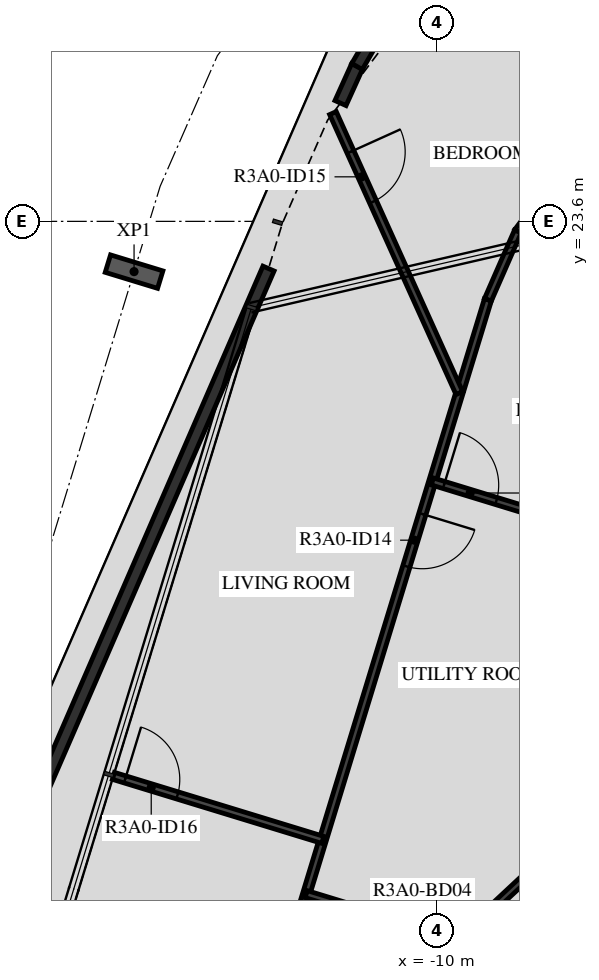
"""IFC4 building model, lengths in metres.
Left out: names, types, materials, properties, quantities, classifications, styles, units other than length and angle.
Written with IfcOpenShell. Run it as: python <this file> out.ifc"""

import sys

from ifc_helpers import new_model, si_unit, direction, frame, frame_2d, origin, origin_2d, place, context, subcontext, project, spatial, rectangle, i_section, extrude, element, fill, save


model = new_model("IFC4")
c1 = context("Model", 3, precision=1e-05, world=origin(), true_north=direction((0.0, 1.0)))
c2 = subcontext(c1, "Body", "Model", "MODEL_VIEW")
j1 = project(units=[si_unit("LENGTHUNIT", "METRE"), si_unit("PLANEANGLEUNIT", "RADIAN")], contexts=[c1])
p1 = place(None, origin())
s1 = spatial("IfcSite", under=j1, at=p1, CompositionType="ELEMENT")
p2 = place(p1, origin())
s2 = spatial("IfcBuilding", under=s1, at=p2, CompositionType="ELEMENT")
p3 = place(p2, frame((0.0, 0.0, 113.4)))
s3 = spatial("IfcBuildingStorey", under=s2, at=p3, CompositionType="ELEMENT", Elevation=113.4)
p4 = place(p3, frame((-14.987, 22.773, -0.45), z_axis=(0.0, 0.0, 1.0), x_axis=(0.29237190653, 0.956304694264, 0.0)))
e1 = element("IfcColumn", 1, at=p4, inside=s3, PredefinedType="COLUMN", context=c2, shape_type="SweptSolid", body=[
    extrude(i_section(OverallWidth=0.3, OverallDepth=0.9, WebThickness=0.019, FlangeThickness=0.035, FilletRadius=0.03, at=origin_2d()), origin(), (0.0, 0.0, 1.0), 3.57),
])
p5 = place(p3, frame((-26.845, -9.558, 0.03), z_axis=(0.0, 0.0, 1.0), x_axis=(0.398491196924, 0.917172157217, 0.0)))
e2 = element("IfcWall", 2, at=p5, inside=s3, PredefinedType="PARAPET", context=c2, shape_type="SweptSolid", body=[
    extrude(rectangle(XDim=35.306, YDim=0.2, at=frame_2d((17.653, 0.0))), origin(), (0.0, 0.0, 1.0), 1.5),
])
p6 = place(p3, frame((-11.593, 25.545, 0.03), z_axis=(0.0, 0.0, 1.0), x_axis=(0.412088088401, 0.911144010241, 0.0)))
e3 = element("IfcWall", 3, at=p6, inside=s3, PredefinedType="PARAPET", context=c2, shape_type="SweptSolid", body=[
    extrude(rectangle(XDim=0.665, YDim=0.2, at=frame_2d((0.333, 0.0))), origin(), (0.0, 0.0, 1.0), 1.5),
])
p7 = place(p3, frame((-11.321, 26.147, 0.03), z_axis=(0.0, 0.0, 1.0), x_axis=(0.502532095663, 0.864558553731, 0.0)))
e4 = element("IfcWall", 4, at=p7, inside=s3, PredefinedType="PARAPET", context=c2, shape_type="SweptSolid", body=[
    extrude(rectangle(XDim=2.257, YDim=0.2, at=frame_2d((1.128, 0.0))), origin(), (0.0, 0.0, 1.0), 1.5),
])
p8 = place(p3, frame((-6.659, 12.523, 0.0), z_axis=(0.0, 0.0, 1.0), x_axis=(-0.731350455479, -0.682001841105, 0.0)))
e5 = element("IfcWall", 5, at=p8, inside=s3, PredefinedType="STANDARD", context=c2, shape_type="SweptSolid", body=[
    extrude(rectangle(XDim=7.342, YDim=0.2, at=frame_2d((3.671, 0.0))), origin(), (0.0, 0.0, 1.0), 3.12),
])
p9 = place(p8, frame((4.2, 0.0, 0.0)))
e6 = element("IfcOpeningElement", 6, at=p9, cuts=e5, PredefinedType="OPENING", context=c2, shape_type="SweptSolid", body=[
    extrude(rectangle(XDim=1.0, YDim=2.1, at=frame_2d((0.5, 1.05))), frame((0.0, 0.11, 0.0), z_axis=(0.0, -1.0, 0.0), x_axis=(1.0, 0.0, 0.0)), (0.0, 0.0, 1.0), 0.22),
])
p10 = place(p3, frame((-7.388, 13.894, 0.0), z_axis=(0.0, 0.0, 1.0), x_axis=(-0.731357186721, -0.681994622729, 0.0)))
e7 = element("IfcWall", 7, at=p10, inside=s3, PredefinedType="PARTITIONING", context=c2, shape_type="SweptSolid", body=[
    extrude(rectangle(XDim=8.146, YDim=0.12, at=frame_2d((4.073, 0.0))), origin(), (0.0, 0.0, 1.0), 3.12),
])
p11 = place(p10, frame((3.509, 0.0, 0.0)))
e8 = element("IfcOpeningElement", 8, at=p11, cuts=e7, PredefinedType="OPENING", context=c2, shape_type="SweptSolid", body=[
    extrude(rectangle(XDim=0.8, YDim=2.1, at=frame_2d((0.4, 1.05))), frame((0.0, 0.07, 0.0), z_axis=(0.0, -1.0, 0.0), x_axis=(1.0, 0.0, 0.0)), (0.0, 0.0, 1.0), 0.14),
])
p12 = place(p3, frame((-8.065, 24.245, 0.0), z_axis=(0.0, 0.0, 1.0), x_axis=(-0.601959070304, -0.798526942363, 0.0)))
e9 = element("IfcWall", 9, at=p12, inside=s3, PredefinedType="PARTITIONING", context=c2, shape_type="SweptSolid", body=[
    extrude(rectangle(XDim=1.016, YDim=0.12, at=frame_2d((0.508, 0.0))), origin(), (0.0, 0.0, 1.0), 3.12),
])
p13 = place(p3, frame((-8.677, 23.433, 0.0), z_axis=(0.0, 0.0, 1.0), x_axis=(-0.401351130635, -0.915924270853, 0.0)))
e10 = element("IfcWall", 10, at=p13, inside=s3, PredefinedType="PARTITIONING", context=c2, shape_type="SweptSolid", body=[
    extrude(rectangle(XDim=1.227, YDim=0.12, at=frame_2d((0.614, 0.0))), origin(), (0.0, 0.0, 1.0), 3.12),
])
p14 = place(p3, frame((-9.169, 22.31, 0.0), z_axis=(0.0, 0.0, 1.0), x_axis=(-0.29236145486, -0.956307889601, 0.0)))
e11 = element("IfcWall", 11, at=p14, inside=s3, PredefinedType="PARTITIONING", context=c2, shape_type="SweptSolid", body=[
    extrude(rectangle(XDim=17.316, YDim=0.12, at=frame_2d((8.658, 0.0))), origin(), (0.0, 0.0, 1.0), 3.12),
])
p15 = place(p14, frame((3.683, 0.0, 0.0)))
e12 = element("IfcOpeningElement", 12, at=p15, cuts=e11, PredefinedType="OPENING", context=c2, shape_type="SweptSolid", body=[
    extrude(rectangle(XDim=0.9, YDim=2.1, at=frame_2d((0.45, 1.05))), frame((0.0, 0.07, 0.0), z_axis=(0.0, -1.0, 0.0), x_axis=(1.0, 0.0, 0.0)), (0.0, 0.0, 1.0), 0.14),
])
p16 = place(p3, frame((-10.082, 19.323, 0.0), z_axis=(0.0, 0.0, 1.0), x_axis=(0.956300011431, -0.292387222936, 0.0)))
e13 = element("IfcWall", 13, at=p16, inside=s3, PredefinedType="PARTITIONING", context=c2, shape_type="SweptSolid", body=[
    extrude(rectangle(XDim=6.324, YDim=0.12, at=frame_2d((3.162, 0.0))), origin(), (0.0, 0.0, 1.0), 3.12),
])
p17 = place(p16, frame((0.2, 0.0, 0.0)))
e14 = element("IfcOpeningElement", 14, at=p17, cuts=e13, PredefinedType="OPENING", context=c2, shape_type="SweptSolid", body=[
    extrude(rectangle(XDim=0.9, YDim=2.1, at=frame_2d((0.45, 1.05))), frame((0.0, 0.07, 0.0), z_axis=(0.0, -1.0, 0.0), x_axis=(1.0, 0.0, 0.0)), (0.0, 0.0, 1.0), 0.14),
])
p18 = place(p3, frame((-11.717, 25.381, 0.0), z_axis=(0.0, 0.0, 1.0), x_axis=(0.411493504767, -0.911412692217, 0.0)))
e15 = element("IfcWall", 15, at=p18, inside=s3, PredefinedType="PARTITIONING", context=c2, shape_type="SweptSolid", body=[
    extrude(rectangle(XDim=5.052, YDim=0.12, at=frame_2d((2.526, 0.0))), origin(), (0.0, 0.0, 1.0), 3.12),
])
p19 = place(p18, frame((0.7, 0.0, 0.0)))
e16 = element("IfcOpeningElement", 16, at=p19, cuts=e15, PredefinedType="OPENING", context=c2, shape_type="SweptSolid", body=[
    extrude(rectangle(XDim=0.9, YDim=2.1, at=frame_2d((0.45, 1.05))), frame((0.0, 0.07, 0.0), z_axis=(0.0, -1.0, 0.0), x_axis=(1.0, 0.0, 0.0)), (0.0, 0.0, 1.0), 0.14),
])
p20 = place(p3, frame((-12.157, 12.537, 0.0), z_axis=(0.0, 0.0, 1.0), x_axis=(0.956293441844, -0.292408708979, 0.0)))
e17 = element("IfcWall", 17, at=p20, inside=s3, PredefinedType="PARTITIONING", context=c2, shape_type="SweptSolid", body=[
    extrude(rectangle(XDim=2.609, YDim=0.12, at=frame_2d((1.305, 0.0))), origin(), (0.0, 0.0, 1.0), 3.12),
])
p21 = place(p3, frame((-15.327, 14.481, 0.0), z_axis=(0.0, 0.0, 1.0), x_axis=(0.956306810244, -0.292364985388, 0.0)))
e18 = element("IfcWall", 18, at=p21, inside=s3, PredefinedType="PARTITIONING", context=c2, shape_type="SweptSolid", body=[
    extrude(rectangle(XDim=3.6, YDim=0.12, at=frame_2d((1.8, 0.0))), origin(), (0.0, 0.0, 1.0), 2.73),
])
p22 = place(p21, frame((0.2, 0.0, 0.0)))
e19 = element("IfcOpeningElement", 19, at=p22, cuts=e18, PredefinedType="OPENING", context=c2, shape_type="SweptSolid", body=[
    extrude(rectangle(XDim=0.9, YDim=2.1, at=frame_2d((0.45, 1.05))), frame((0.0, 0.07, 0.0), z_axis=(0.0, -1.0, 0.0), x_axis=(1.0, 0.0, 0.0)), (0.0, 0.0, 1.0), 0.14),
])
p23 = place(p17, origin())
e20 = element("IfcDoor", 20, at=p23, inside=s3, OperationType="SINGLE_SWING_LEFT", PredefinedType="DOOR", context=c2, shape_type="SweptSolid", body=[
    extrude(rectangle(XDim=0.9, YDim=2.1, at=frame_2d((0.45, 1.05))), frame((0.0, 0.025, 0.0), z_axis=(0.0, -1.0, 0.0), x_axis=(1.0, 0.0, 0.0)), (0.0, 0.0, 1.0), 0.05),
])
fill(e14, e20)
p24 = place(p15, origin())
e21 = element("IfcDoor", 21, at=p24, inside=s3, OperationType="SINGLE_SWING_LEFT", PredefinedType="DOOR", context=c2, shape_type="SweptSolid", body=[
    extrude(rectangle(XDim=0.9, YDim=2.1, at=frame_2d((0.45, 1.05))), frame((0.0, 0.025, 0.0), z_axis=(0.0, -1.0, 0.0), x_axis=(1.0, 0.0, 0.0)), (0.0, 0.0, 1.0), 0.05),
])
fill(e12, e21)
p25 = place(p19, origin())
e22 = element("IfcDoor", 22, at=p25, inside=s3, OperationType="SINGLE_SWING_LEFT", PredefinedType="DOOR", context=c2, shape_type="SweptSolid", body=[
    extrude(rectangle(XDim=0.9, YDim=2.1, at=frame_2d((0.45, 1.05))), frame((0.0, 0.025, 0.0), z_axis=(0.0, -1.0, 0.0), x_axis=(1.0, 0.0, 0.0)), (0.0, 0.0, 1.0), 0.05),
])
fill(e16, e22)
p26 = place(p22, origin())
e23 = element("IfcDoor", 23, at=p26, inside=s3, OperationType="SINGLE_SWING_RIGHT", PredefinedType="DOOR", context=c2, shape_type="SweptSolid", body=[
    extrude(rectangle(XDim=0.9, YDim=2.1, at=frame_2d((0.45, 1.05))), frame((0.0, 0.025, 0.0), z_axis=(0.0, -1.0, 0.0), x_axis=(1.0, 0.0, 0.0)), (0.0, 0.0, 1.0), 0.05),
])
fill(e19, e23)
save(model, sys.argv[1])
